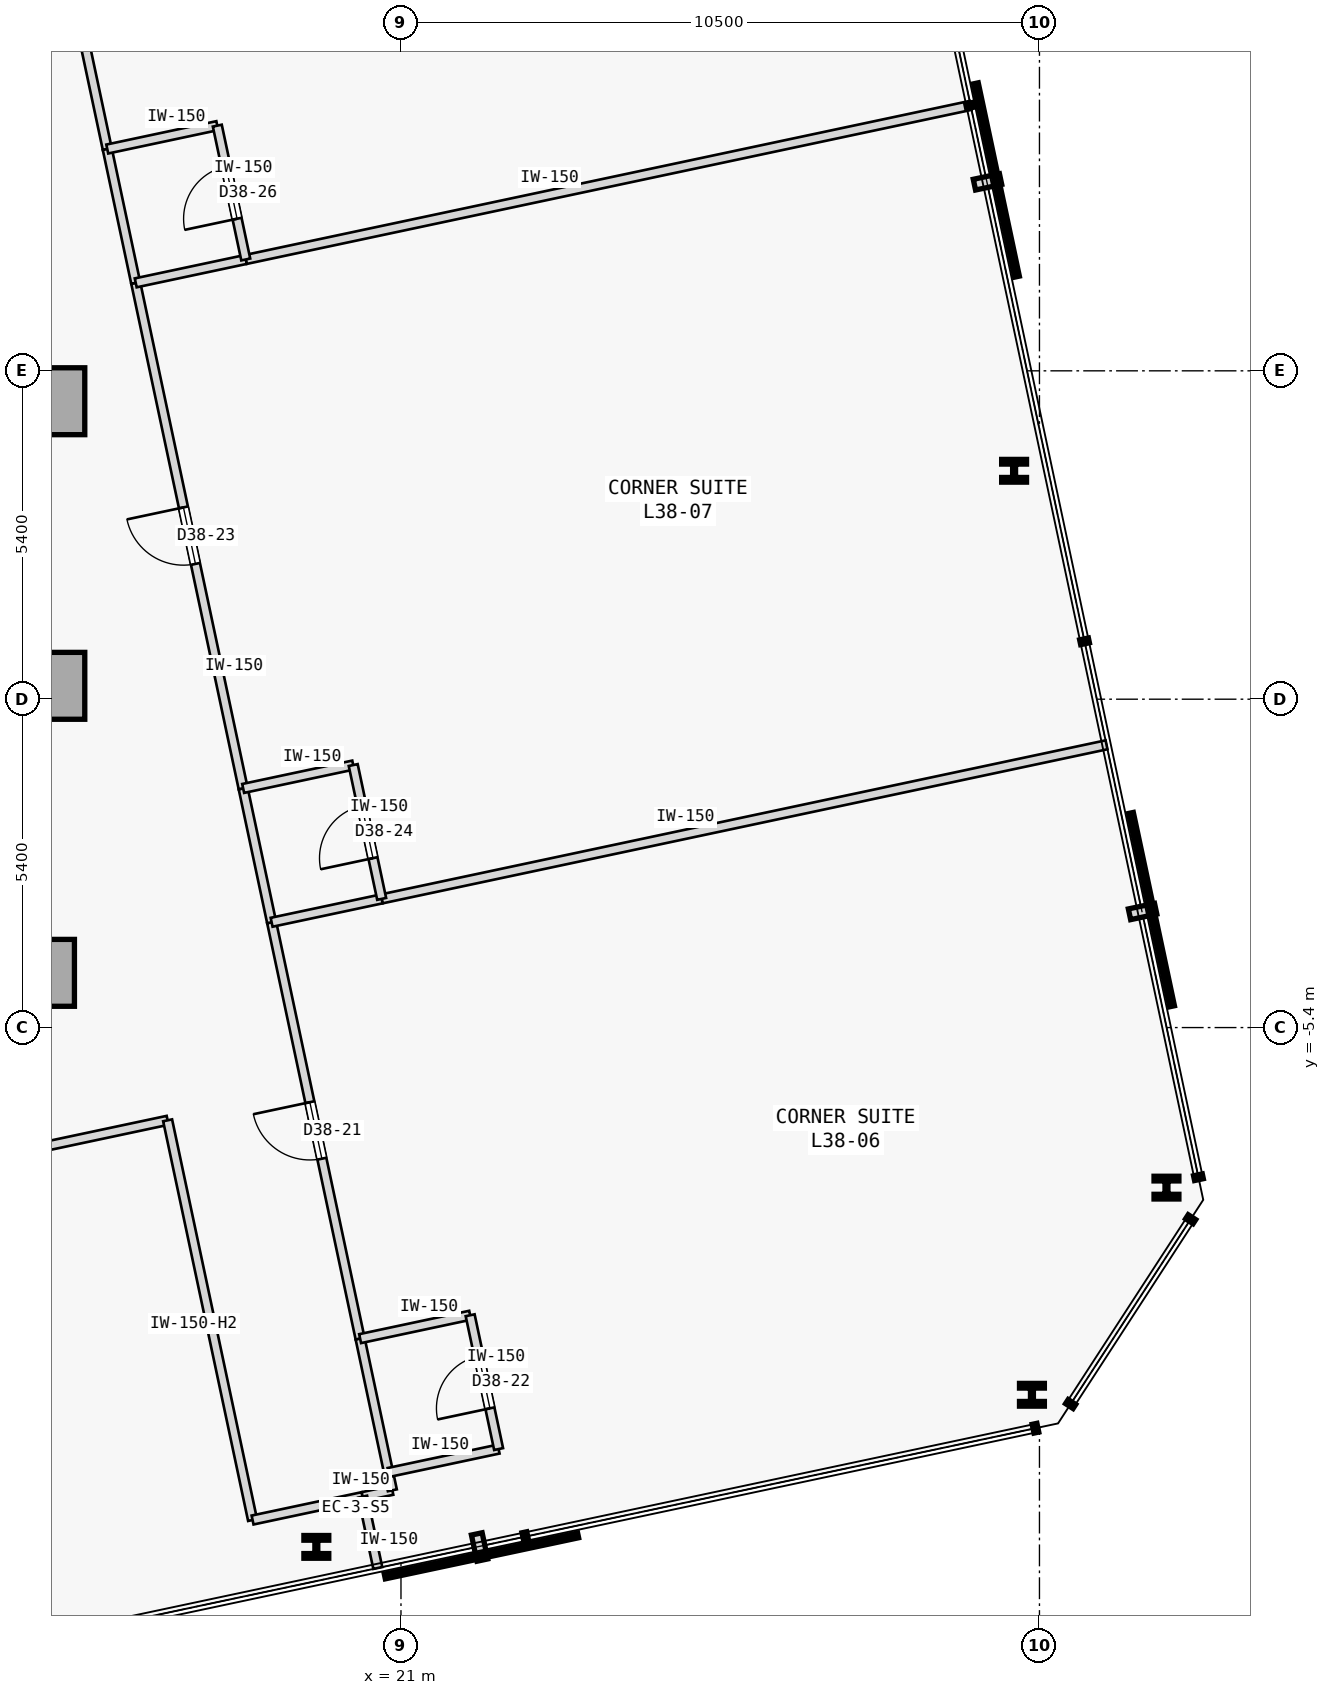
"""IFC4 building model, lengths in metres.
Left out: names, types, materials, properties, quantities, classifications, styles, units other than length and angle.
Written with IfcOpenShell. Run it as: python <this file> out.ifc"""

import sys

from ifc_helpers import new_model, si_unit, direction, frame, frame_2d, origin, origin_2d, place, context, subcontext, project, spatial, rectangle, i_section, extrude, element, fill, save


model = new_model("IFC4")
c1 = context("Model", 3, precision=1e-05, world=origin(), true_north=direction((0.0, 1.0)))
c2 = subcontext(c1, "Body", "Model", "MODEL_VIEW")
j1 = project(units=[si_unit("LENGTHUNIT", "METRE"), si_unit("PLANEANGLEUNIT", "RADIAN")], contexts=[c1])
p1 = place(None, origin())
s1 = spatial("IfcSite", under=j1, at=p1, CompositionType="ELEMENT")
p2 = place(p1, origin())
s2 = spatial("IfcBuilding", under=s1, at=p2, CompositionType="ELEMENT")
p3 = place(p2, frame((0.0, 0.0, 151.4)))
s3 = spatial("IfcBuildingStorey", under=s2, at=p3, CompositionType="ELEMENT", Elevation=151.4)
for number, where, z_axis, x_axis in (
    (1, (15.25, 4.9, 0.0), (0.0, 0.0, 1.0), (1.0, 0.0, 0.0)),
    (2, (15.25, 0.22, 0.0), (0.0, 0.0, 1.0), (1.0, 0.0, 0.0)),
    (3, (15.08, -4.5, 0.0), (0.0, 0.0, 1.0), (1.0, 0.0, 0.0)),
):
    element("IfcColumn", number, at=place(p3, frame(where, z_axis=z_axis, x_axis=x_axis)), inside=s3, PredefinedType="COLUMN", context=c2, shape_type="SweptSolid", body=[
        extrude(rectangle(XDim=1.1, YDim=1.1, at=origin_2d()), origin(), (0.0, 0.0, 1.0), 3.4),
    ])
for number, where, z_axis, x_axis in (
    (4, (19.608, -13.94, 0.0), (0.0, 0.0, 1.0), (1.0, 0.0, 0.0)),
    (5, (31.376, -11.439, 0.0), (0.0, 0.0, 1.0), (1.0, 0.0, 0.0)),
    (6, (33.589, -8.032, 0.0), (0.0, 0.0, 1.0), (1.0, 0.0, 0.0)),
    (7, (31.083, 3.756, 0.0), (0.0, 0.0, 1.0), (1.0, 0.0, 0.0)),
):
    element("IfcColumn", number, at=place(p3, frame(where, z_axis=z_axis, x_axis=x_axis)), inside=s3, PredefinedType="COLUMN", context=c2, shape_type="SweptSolid", body=[
        extrude(i_section(OverallWidth=0.409, OverallDepth=0.374, WebThickness=0.048, FlangeThickness=0.077, FilletRadius=0.015, at=origin_2d()), origin(), (0.0, 0.0, 1.0), 3.4),
    ])
p4 = place(p3, frame((-12.862, -13.307, 0.0), z_axis=(0.0, 0.0, 1.0), x_axis=(0.97814793387, 0.207910123527, 0.0)))
e8 = element("IfcWall", 8, at=p4, inside=s3, PredefinedType="PARTITIONING", context=c2, shape_type="SweptSolid", body=[
    extrude(rectangle(XDim=30.695, YDim=0.15, at=frame_2d((15.348, 0.0))), origin(), (0.0, 0.0, 1.0), 3.175),
])
p5 = place(p4, frame((14.887, 0.0, 0.0)))
e9 = element("IfcOpeningElement", 9, at=p5, cuts=e8, PredefinedType="OPENING", context=c2, shape_type="SweptSolid", body=[
    extrude(rectangle(XDim=0.92, YDim=2.15, at=frame_2d((0.46, 1.075))), frame((0.0, 0.085, 0.0), z_axis=(0.0, -1.0, 0.0), x_axis=(1.0, 0.0, 0.0)), (0.0, 0.0, 1.0), 0.17),
])
p6 = place(p3, frame((18.56, -13.498, 0.0), z_axis=(0.0, 0.0, 1.0), x_axis=(-0.207888737749, 0.978152479278, 0.0)))
e10 = element("IfcWall", 10, at=p6, inside=s3, PredefinedType="PARTITIONING", context=c2, shape_type="SweptSolid", body=[
    extrude(rectangle(XDim=6.72, YDim=0.15, at=frame_2d((3.36, 0.0))), origin(), (0.0, 0.0, 1.0), 2.575),
])
p7 = place(p3, frame((18.56, -13.498, 0.0), z_axis=(0.0, 0.0, 1.0), x_axis=(0.978160192495, 0.207852442415, 0.0)))
e11 = element("IfcWall", 11, at=p7, inside=s3, PredefinedType="PARTITIONING", context=c2, shape_type="SweptSolid", body=[
    extrude(rectangle(XDim=1.85, YDim=0.15, at=frame_2d((0.925, 0.0))), origin(), (0.0, 0.0, 1.0), 3.175),
])
p8 = place(p3, frame((20.369, -13.114, 0.0), z_axis=(0.0, 0.0, 1.0), x_axis=(0.978143962546, 0.207928806409, 0.0)))
e12 = element("IfcWall", 12, at=p8, inside=s3, PredefinedType="PARTITIONING", context=c2, shape_type="SweptSolid", body=[
    extrude(rectangle(XDim=0.5, YDim=0.15, at=frame_2d((0.25, 0.0))), origin(), (0.0, 0.0, 1.0), 3.175),
])
p9 = place(p3, frame((20.858, -13.01, 0.0), z_axis=(0.0, 0.0, 1.0), x_axis=(-0.208306395052, 0.978063620518, 0.0)))
e13 = element("IfcWall", 13, at=p9, inside=s3, PredefinedType="PARTITIONING", context=c2, shape_type="SweptSolid", body=[
    extrude(rectangle(XDim=0.3, YDim=0.15, at=frame_2d((0.15, 0.0))), origin(), (0.0, 0.0, 1.0), 3.175),
])
p10 = place(p3, frame((20.328, -10.515, 0.0), z_axis=(0.0, 0.0, 1.0), x_axis=(-0.207906726269, 0.978148655968, 0.0)))
e14 = element("IfcWall", 14, at=p10, inside=s3, PredefinedType="PARTITIONING", context=c2, shape_type="SweptSolid", body=[
    extrude(rectangle(XDim=7.0, YDim=0.15, at=frame_2d((3.5, 0.0))), origin(), (0.0, 0.0, 1.0), 3.175),
])
p11 = place(p10, frame((3.025, 0.0, 0.0)))
e15 = element("IfcOpeningElement", 15, at=p11, cuts=e14, PredefinedType="OPENING", context=c2, shape_type="SweptSolid", body=[
    extrude(rectangle(XDim=0.95, YDim=2.15, at=frame_2d((0.475, 1.075))), frame((0.0, 0.085, 0.0), z_axis=(0.0, -1.0, 0.0), x_axis=(1.0, 0.0, 0.0)), (0.0, 0.0, 1.0), 0.17),
])
p12 = place(p3, frame((20.796, -12.716, 0.0), z_axis=(0.0, 0.0, 1.0), x_axis=(-0.207891197838, 0.978151956427, 0.0)))
e16 = element("IfcWall", 16, at=p12, inside=s3, PredefinedType="PARTITIONING", context=c2, shape_type="SweptSolid", body=[
    extrude(rectangle(XDim=2.25, YDim=0.15, at=frame_2d((1.125, 0.0))), origin(), (0.0, 0.0, 1.0), 3.175),
])
p13 = place(p3, frame((18.405, -1.468, 0.0), z_axis=(0.0, 0.0, 1.0), x_axis=(-0.207888984761, 0.97815242678, 0.0)))
e17 = element("IfcWall", 17, at=p13, inside=s3, PredefinedType="PARTITIONING", context=c2, shape_type="SweptSolid", body=[
    extrude(rectangle(XDim=8.5, YDim=0.15, at=frame_2d((4.25, 0.0))), origin(), (0.0, 0.0, 1.0), 3.175),
])
p14 = place(p13, frame((3.775, 0.0, 0.0)))
e18 = element("IfcOpeningElement", 18, at=p14, cuts=e17, PredefinedType="OPENING", context=c2, shape_type="SweptSolid", body=[
    extrude(rectangle(XDim=0.95, YDim=2.15, at=frame_2d((0.475, 1.075))), frame((0.0, 0.085, 0.0), z_axis=(0.0, -1.0, 0.0), x_axis=(1.0, 0.0, 0.0)), (0.0, 0.0, 1.0), 0.17),
])
p15 = place(p3, frame((18.873, -3.668, 0.0), z_axis=(0.0, 0.0, 1.0), x_axis=(-0.208017083936, 0.9781251928, 0.0)))
e19 = element("IfcWall", 19, at=p15, inside=s3, PredefinedType="PARTITIONING", context=c2, shape_type="SweptSolid", body=[
    extrude(rectangle(XDim=2.25, YDim=0.15, at=frame_2d((1.125, 0.0))), origin(), (0.0, 0.0, 1.0), 3.175),
])
p16 = place(p3, frame((16.17, 9.047, 0.0), z_axis=(0.0, 0.0, 1.0), x_axis=(-0.2079164651, 0.978146585917, 0.0)))
e20 = element("IfcWall", 20, at=p16, inside=s3, PredefinedType="PARTITIONING", context=c2, shape_type="SweptSolid", body=[
    extrude(rectangle(XDim=8.5, YDim=0.15, at=frame_2d((4.25, 0.0))), origin(), (0.0, 0.0, 1.0), 3.175),
])
p17 = place(p16, frame((3.775, 0.0, 0.0)))
e21 = element("IfcOpeningElement", 21, at=p17, cuts=e20, PredefinedType="OPENING", context=c2, shape_type="SweptSolid", body=[
    extrude(rectangle(XDim=0.95, YDim=2.15, at=frame_2d((0.475, 1.075))), frame((0.0, 0.085, 0.0), z_axis=(0.0, -1.0, 0.0), x_axis=(1.0, 0.0, 0.0)), (0.0, 0.0, 1.0), 0.17),
])
p18 = place(p3, frame((16.638, 6.847, 0.0), z_axis=(0.0, 0.0, 1.0), x_axis=(-0.207913264065, 0.978147266328, 0.0)))
e22 = element("IfcWall", 22, at=p18, inside=s3, PredefinedType="PARTITIONING", context=c2, shape_type="SweptSolid", body=[
    extrude(rectangle(XDim=2.25, YDim=0.15, at=frame_2d((1.125, 0.0))), origin(), (0.0, 0.0, 1.0), 3.175),
])
p19 = place(p3, frame((20.619, -14.288, 0.0), z_axis=(0.0, 0.0, 1.0), x_axis=(-0.207917150959, 0.978146440129, 0.0)))
e23 = element("IfcWall", 23, at=p19, inside=s3, PredefinedType="PARTITIONING", context=c2, shape_type="SweptSolid", body=[
    extrude(rectangle(XDim=1.2, YDim=0.15, at=frame_2d((0.6, 0.0))), origin(), (0.0, 0.0, 1.0), 3.175),
])
for number, where, z_axis, x_axis in (
    (24, (20.796, -12.716, 0.0), (0.0, 0.0, 1.0), (0.978, 0.208, 0.0)),
    (25, (20.328, -10.515, 0.0), (0.0, 0.0, 1.0), (0.978, 0.208, 0.0)),
):
    element("IfcWall", number, at=place(p3, frame(where, z_axis=z_axis, x_axis=x_axis)), inside=s3, PredefinedType="PARTITIONING", context=c2, shape_type="SweptSolid", body=[
        extrude(rectangle(XDim=1.85, YDim=0.15, at=frame_2d((0.925, 0.0))), origin(), (0.0, 0.0, 1.0), 3.175),
    ])
p20 = place(p3, frame((22.605, -12.332, 0.0), z_axis=(0.0, 0.0, 1.0), x_axis=(-0.207891197838, 0.978151956427, 0.0)))
e26 = element("IfcWall", 26, at=p20, inside=s3, PredefinedType="PARTITIONING", context=c2, shape_type="SweptSolid", body=[
    extrude(rectangle(XDim=2.25, YDim=0.15, at=frame_2d((1.125, 0.0))), origin(), (0.0, 0.0, 1.0), 3.175),
])
p21 = place(p20, frame((0.685, 0.0, 0.0)))
e27 = element("IfcOpeningElement", 27, at=p21, cuts=e26, PredefinedType="OPENING", context=c2, shape_type="SweptSolid", body=[
    extrude(rectangle(XDim=0.88, YDim=2.15, at=frame_2d((0.44, 1.075))), frame((0.0, 0.085, 0.0), z_axis=(0.0, -1.0, 0.0), x_axis=(1.0, 0.0, 0.0)), (0.0, 0.0, 1.0), 0.17),
])
p22 = place(p3, frame((20.682, -3.284, 0.0), z_axis=(0.0, 0.0, 1.0), x_axis=(0.97814556055, 0.207921288896, 0.0)))
e28 = element("IfcWall", 28, at=p22, inside=s3, PredefinedType="PARTITIONING", context=c2, shape_type="SweptSolid", body=[
    extrude(rectangle(XDim=12.187, YDim=0.15, at=frame_2d((6.094, 0.0))), origin(), (0.0, 0.0, 1.0), 3.175),
])
p23 = place(p3, frame((18.873, -3.668, 0.0), z_axis=(0.0, 0.0, 1.0), x_axis=(0.978160192495, 0.207852442415, 0.0)))
e29 = element("IfcWall", 29, at=p23, inside=s3, PredefinedType="PARTITIONING", context=c2, shape_type="SweptSolid", body=[
    extrude(rectangle(XDim=1.85, YDim=0.15, at=frame_2d((0.925, 0.0))), origin(), (0.0, 0.0, 1.0), 3.175),
])
p24 = place(p3, frame((18.405, -1.468, 0.0), z_axis=(0.0, 0.0, 1.0), x_axis=(0.978139061018, 0.207951862966, 0.0)))
e30 = element("IfcWall", 30, at=p24, inside=s3, PredefinedType="PARTITIONING", context=c2, shape_type="SweptSolid", body=[
    extrude(rectangle(XDim=1.85, YDim=0.15, at=frame_2d((0.925, 0.0))), origin(), (0.0, 0.0, 1.0), 3.175),
])
p25 = place(p3, frame((20.682, -3.284, 0.0), z_axis=(0.0, 0.0, 1.0), x_axis=(-0.207891197838, 0.978151956427, 0.0)))
e31 = element("IfcWall", 31, at=p25, inside=s3, PredefinedType="PARTITIONING", context=c2, shape_type="SweptSolid", body=[
    extrude(rectangle(XDim=2.25, YDim=0.15, at=frame_2d((1.125, 0.0))), origin(), (0.0, 0.0, 1.0), 3.175),
])
p26 = place(p25, frame((0.685, 0.0, 0.0)))
e32 = element("IfcOpeningElement", 32, at=p26, cuts=e31, PredefinedType="OPENING", context=c2, shape_type="SweptSolid", body=[
    extrude(rectangle(XDim=0.88, YDim=2.15, at=frame_2d((0.44, 1.075))), frame((0.0, 0.085, 0.0), z_axis=(0.0, -1.0, 0.0), x_axis=(1.0, 0.0, 0.0)), (0.0, 0.0, 1.0), 0.17),
])
p27 = place(p3, frame((18.447, 7.231, 0.0), z_axis=(0.0, 0.0, 1.0), x_axis=(0.978149634612, 0.207902121941, 0.0)))
e33 = element("IfcWall", 33, at=p27, inside=s3, PredefinedType="PARTITIONING", context=c2, shape_type="SweptSolid", body=[
    extrude(rectangle(XDim=12.187, YDim=0.15, at=frame_2d((6.094, 0.0))), origin(), (0.0, 0.0, 1.0), 3.175),
])
p28 = place(p3, frame((16.638, 6.847, 0.0), z_axis=(0.0, 0.0, 1.0), x_axis=(0.978160192495, 0.207852442415, 0.0)))
e34 = element("IfcWall", 34, at=p28, inside=s3, PredefinedType="PARTITIONING", context=c2, shape_type="SweptSolid", body=[
    extrude(rectangle(XDim=1.85, YDim=0.15, at=frame_2d((0.925, 0.0))), origin(), (0.0, 0.0, 1.0), 3.175),
])
p29 = place(p3, frame((16.17, 9.047, 0.0), z_axis=(0.0, 0.0, 1.0), x_axis=(0.978133353907, 0.20797870558, 0.0)))
e35 = element("IfcWall", 35, at=p29, inside=s3, PredefinedType="PARTITIONING", context=c2, shape_type="SweptSolid", body=[
    extrude(rectangle(XDim=1.85, YDim=0.15, at=frame_2d((0.925, 0.0))), origin(), (0.0, 0.0, 1.0), 3.175),
])
p30 = place(p3, frame((18.447, 7.231, 0.0), z_axis=(0.0, 0.0, 1.0), x_axis=(-0.207891197838, 0.978151956427, 0.0)))
e36 = element("IfcWall", 36, at=p30, inside=s3, PredefinedType="PARTITIONING", context=c2, shape_type="SweptSolid", body=[
    extrude(rectangle(XDim=2.25, YDim=0.15, at=frame_2d((1.125, 0.0))), origin(), (0.0, 0.0, 1.0), 3.175),
])
p31 = place(p30, frame((0.685, 0.0, 0.0)))
e37 = element("IfcOpeningElement", 37, at=p31, cuts=e36, PredefinedType="OPENING", context=c2, shape_type="SweptSolid", body=[
    extrude(rectangle(XDim=0.88, YDim=2.15, at=frame_2d((0.44, 1.075))), frame((0.0, 0.085, 0.0), z_axis=(0.0, -1.0, 0.0), x_axis=(1.0, 0.0, 0.0)), (0.0, 0.0, 1.0), 0.17),
])
p32 = place(p11, origin())
e38 = element("IfcDoor", 38, at=p32, inside=s3, OperationType="SINGLE_SWING_RIGHT", PredefinedType="DOOR", context=c2, shape_type="SweptSolid", body=[
    extrude(rectangle(XDim=0.95, YDim=2.15, at=frame_2d((0.475, 1.075))), frame((0.0, 0.025, 0.0), z_axis=(0.0, -1.0, 0.0), x_axis=(1.0, 0.0, 0.0)), (0.0, 0.0, 1.0), 0.05),
])
fill(e15, e38)
p33 = place(p21, origin())
e39 = element("IfcDoor", 39, at=p33, inside=s3, OperationType="SINGLE_SWING_LEFT", PredefinedType="DOOR", context=c2, shape_type="SweptSolid", body=[
    extrude(rectangle(XDim=0.88, YDim=2.15, at=frame_2d((0.44, 1.075))), frame((0.0, 0.025, 0.0), z_axis=(0.0, -1.0, 0.0), x_axis=(1.0, 0.0, 0.0)), (0.0, 0.0, 1.0), 0.05),
])
fill(e27, e39)
p34 = place(p14, origin())
e40 = element("IfcDoor", 40, at=p34, inside=s3, OperationType="SINGLE_SWING_RIGHT", PredefinedType="DOOR", context=c2, shape_type="SweptSolid", body=[
    extrude(rectangle(XDim=0.95, YDim=2.15, at=frame_2d((0.475, 1.075))), frame((0.0, 0.025, 0.0), z_axis=(0.0, -1.0, 0.0), x_axis=(1.0, 0.0, 0.0)), (0.0, 0.0, 1.0), 0.05),
])
fill(e18, e40)
p35 = place(p26, origin())
e41 = element("IfcDoor", 41, at=p35, inside=s3, OperationType="SINGLE_SWING_LEFT", PredefinedType="DOOR", context=c2, shape_type="SweptSolid", body=[
    extrude(rectangle(XDim=0.88, YDim=2.15, at=frame_2d((0.44, 1.075))), frame((0.0, 0.025, 0.0), z_axis=(0.0, -1.0, 0.0), x_axis=(1.0, 0.0, 0.0)), (0.0, 0.0, 1.0), 0.05),
])
fill(e32, e41)
p36 = place(p31, origin())
e42 = element("IfcDoor", 42, at=p36, inside=s3, OperationType="SINGLE_SWING_LEFT", PredefinedType="DOOR", context=c2, shape_type="SweptSolid", body=[
    extrude(rectangle(XDim=0.88, YDim=2.15, at=frame_2d((0.44, 1.075))), frame((0.0, 0.025, 0.0), z_axis=(0.0, -1.0, 0.0), x_axis=(1.0, 0.0, 0.0)), (0.0, 0.0, 1.0), 0.05),
])
fill(e37, e42)
save(model, sys.argv[1])
